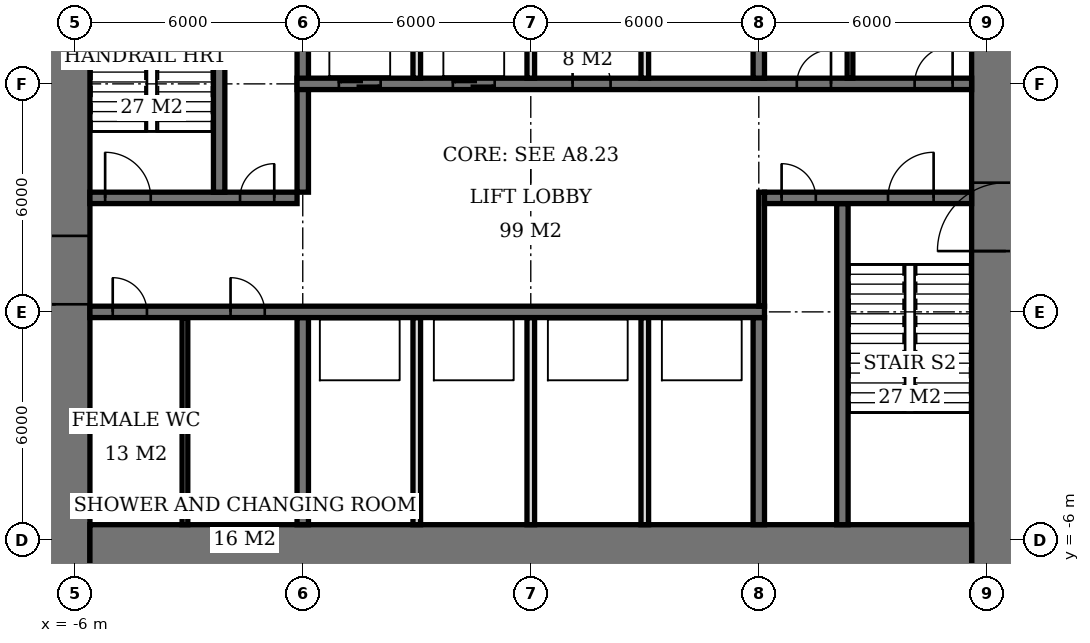
"""IFC4 building model, lengths in metres.
Left out: names, types, materials, properties, quantities, classifications, styles, units other than length and angle.
Written with IfcOpenShell. Run it as: python <this file> out.ifc"""

import sys

from ifc_helpers import new_model, si_unit, direction, frame, frame_2d, origin, place, context, subcontext, project, spatial, rectangle, extrude, element, fill, save


model = new_model("IFC4")
c1 = context("Model", 3, precision=1e-05, world=origin(), true_north=direction((0.0, 1.0)))
c2 = subcontext(c1, "Body", "Model", "MODEL_VIEW")
j1 = project(units=[si_unit("LENGTHUNIT", "METRE"), si_unit("PLANEANGLEUNIT", "RADIAN")], contexts=[c1])
p1 = place(None, origin())
s1 = spatial("IfcSite", under=j1, at=p1, CompositionType="ELEMENT")
p2 = place(p1, origin())
s2 = spatial("IfcBuilding", under=s1, at=p2, CompositionType="ELEMENT")
p3 = place(p2, frame((0.0, 0.0, 88.4)))
s3 = spatial("IfcBuildingStorey", under=s2, at=p3, CompositionType="ELEMENT", Elevation=88.4)
p4 = place(p3, frame((-5.6, -6.6, 0.0), z_axis=(0.0, 0.0, 1.0), x_axis=(1.0, 0.0, 0.0)))
e1 = element("IfcWall", 1, at=p4, inside=s3, PredefinedType="SHEAR", context=c2, shape_type="SweptSolid", body=[
    extrude(rectangle(XDim=23.2, YDim=2.0, at=frame_2d((11.6, 0.0))), origin(), (0.0, 0.0, 1.0), 5.4),
])
p5 = place(p3, frame((-6.5, -7.6, 0.0), z_axis=(0.0, 0.0, 1.0), x_axis=(0.0, 1.0, 0.0)))
e2 = element("IfcWall", 2, at=p5, inside=s3, PredefinedType="SHEAR", context=c2, shape_type="SweptSolid", body=[
    extrude(rectangle(XDim=21.2, YDim=1.8, at=frame_2d((10.6, 0.0))), origin(), (0.0, 0.0, 1.0), 5.4),
])
p6 = place(p5, frame((7.8, 0.0, 0.0)))
e3 = element("IfcOpeningElement", 3, at=p6, cuts=e2, PredefinedType="OPENING", context=c2, shape_type="SweptSolid", body=[
    extrude(rectangle(XDim=1.8, YDim=2.4, at=frame_2d((0.9, 1.2))), frame((0.0, 0.91, 0.0), z_axis=(0.0, -1.0, 0.0), x_axis=(1.0, 0.0, 0.0)), (0.0, 0.0, 1.0), 1.82),
])
p7 = place(p3, frame((18.5, -7.6, 0.0), z_axis=(0.0, 0.0, 1.0), x_axis=(0.0, 1.0, 0.0)))
e4 = element("IfcWall", 4, at=p7, inside=s3, PredefinedType="SHEAR", context=c2, shape_type="SweptSolid", body=[
    extrude(rectangle(XDim=21.2, YDim=1.8, at=frame_2d((10.6, 0.0))), origin(), (0.0, 0.0, 1.0), 5.4),
])
p8 = place(p7, frame((9.2, 0.0, 0.0)))
e5 = element("IfcOpeningElement", 5, at=p8, cuts=e4, PredefinedType="OPENING", context=c2, shape_type="SweptSolid", body=[
    extrude(rectangle(XDim=1.8, YDim=2.4, at=frame_2d((0.9, 1.2))), frame((0.0, 0.91, 0.0), z_axis=(0.0, -1.0, 0.0), x_axis=(1.0, 0.0, 0.0)), (0.0, 0.0, 1.0), 1.82),
])
p9 = place(p3, frame((-5.6, 0.0, 0.0), z_axis=(0.0, 0.0, 1.0), x_axis=(1.0, 0.0, 0.0)))
e6 = element("IfcWall", 6, at=p9, inside=s3, PredefinedType="SHEAR", context=c2, shape_type="SweptSolid", body=[
    extrude(rectangle(XDim=17.75, YDim=0.3, at=frame_2d((8.875, 0.0))), origin(), (0.0, 0.0, 1.0), 5.4),
])
p10 = place(p9, frame((0.6, 0.0, 0.0)))
e7 = element("IfcOpeningElement", 7, at=p10, cuts=e6, PredefinedType="OPENING", context=c2, shape_type="SweptSolid", body=[
    extrude(rectangle(XDim=0.9, YDim=2.1, at=frame_2d((0.45, 1.05))), frame((0.0, 0.16, 0.0), z_axis=(0.0, -1.0, 0.0), x_axis=(1.0, 0.0, 0.0)), (0.0, 0.0, 1.0), 0.32),
])
p11 = place(p9, frame((3.7, 0.0, 0.0)))
e8 = element("IfcOpeningElement", 8, at=p11, cuts=e6, PredefinedType="OPENING", context=c2, shape_type="SweptSolid", body=[
    extrude(rectangle(XDim=0.9, YDim=2.1, at=frame_2d((0.45, 1.05))), frame((0.0, 0.16, 0.0), z_axis=(0.0, -1.0, 0.0), x_axis=(1.0, 0.0, 0.0)), (0.0, 0.0, 1.0), 0.32),
])
p12 = place(p3, frame((-5.6, 3.0, 0.0), z_axis=(0.0, 0.0, 1.0), x_axis=(1.0, 0.0, 0.0)))
e9 = element("IfcWall", 9, at=p12, inside=s3, PredefinedType="SHEAR", context=c2, shape_type="SweptSolid", body=[
    extrude(rectangle(XDim=5.45, YDim=0.3, at=frame_2d((2.725, 0.0))), origin(), (0.0, 0.0, 1.0), 5.4),
])
p13 = place(p12, frame((0.4, 0.0, 0.0)))
e10 = element("IfcOpeningElement", 10, at=p13, cuts=e9, PredefinedType="OPENING", context=c2, shape_type="SweptSolid", body=[
    extrude(rectangle(XDim=1.2, YDim=2.1, at=frame_2d((0.6, 1.05))), frame((0.0, 0.16, 0.0), z_axis=(0.0, -1.0, 0.0), x_axis=(1.0, 0.0, 0.0)), (0.0, 0.0, 1.0), 0.32),
])
p14 = place(p12, frame((3.95, 0.0, 0.0)))
e11 = element("IfcOpeningElement", 11, at=p14, cuts=e9, PredefinedType="OPENING", context=c2, shape_type="SweptSolid", body=[
    extrude(rectangle(XDim=0.9, YDim=2.1, at=frame_2d((0.45, 1.05))), frame((0.0, 0.16, 0.0), z_axis=(0.0, -1.0, 0.0), x_axis=(1.0, 0.0, 0.0)), (0.0, 0.0, 1.0), 0.32),
])
p15 = place(p3, frame((12.15, 3.0, 0.0), z_axis=(0.0, 0.0, 1.0), x_axis=(1.0, 0.0, 0.0)))
e12 = element("IfcWall", 12, at=p15, inside=s3, PredefinedType="SHEAR", context=c2, shape_type="SweptSolid", body=[
    extrude(rectangle(XDim=5.45, YDim=0.3, at=frame_2d((2.725, 0.0))), origin(), (0.0, 0.0, 1.0), 5.4),
])
p16 = place(p15, frame((3.25, 0.0, 0.0)))
e13 = element("IfcOpeningElement", 13, at=p16, cuts=e12, PredefinedType="OPENING", context=c2, shape_type="SweptSolid", body=[
    extrude(rectangle(XDim=1.2, YDim=2.1, at=frame_2d((0.6, 1.05))), frame((0.0, 0.16, 0.0), z_axis=(0.0, -1.0, 0.0), x_axis=(1.0, 0.0, 0.0)), (0.0, 0.0, 1.0), 0.32),
])
p17 = place(p15, frame((0.45, 0.0, 0.0)))
e14 = element("IfcOpeningElement", 14, at=p17, cuts=e12, PredefinedType="OPENING", context=c2, shape_type="SweptSolid", body=[
    extrude(rectangle(XDim=0.9, YDim=2.1, at=frame_2d((0.45, 1.05))), frame((0.0, 0.16, 0.0), z_axis=(0.0, -1.0, 0.0), x_axis=(1.0, 0.0, 0.0)), (0.0, 0.0, 1.0), 0.32),
])
p18 = place(p3, frame((-0.15, 6.0, 0.0), z_axis=(0.0, 0.0, 1.0), x_axis=(1.0, 0.0, 0.0)))
e15 = element("IfcWall", 15, at=p18, inside=s3, PredefinedType="SHEAR", context=c2, shape_type="SweptSolid", body=[
    extrude(rectangle(XDim=17.75, YDim=0.3, at=frame_2d((8.875, 0.0))), origin(), (0.0, 0.0, 1.0), 5.4),
])
p19 = place(p18, frame((13.15, 0.0, 0.0)))
e16 = element("IfcOpeningElement", 16, at=p19, cuts=e15, PredefinedType="OPENING", context=c2, shape_type="SweptSolid", body=[
    extrude(rectangle(XDim=0.9, YDim=2.1, at=frame_2d((0.45, 1.05))), frame((0.0, 0.16, 0.0), z_axis=(0.0, -1.0, 0.0), x_axis=(1.0, 0.0, 0.0)), (0.0, 0.0, 1.0), 0.32),
])
p20 = place(p18, frame((16.25, 0.0, 0.0)))
e17 = element("IfcOpeningElement", 17, at=p20, cuts=e15, PredefinedType="OPENING", context=c2, shape_type="SweptSolid", body=[
    extrude(rectangle(XDim=1.0, YDim=2.1, at=frame_2d((0.5, 1.05))), frame((0.0, 0.16, 0.0), z_axis=(0.0, -1.0, 0.0), x_axis=(1.0, 0.0, 0.0)), (0.0, 0.0, 1.0), 0.32),
])
p21 = place(p18, frame((7.25, 0.0, 0.0)))
e18 = element("IfcOpeningElement", 18, at=p21, cuts=e15, PredefinedType="OPENING", context=c2, shape_type="SweptSolid", body=[
    extrude(rectangle(XDim=1.0, YDim=2.1, at=frame_2d((0.5, 1.05))), frame((0.0, 0.16, 0.0), z_axis=(0.0, -1.0, 0.0), x_axis=(1.0, 0.0, 0.0)), (0.0, 0.0, 1.0), 0.32),
])
p22 = place(p18, frame((1.1, 0.0, 0.0)))
e19 = element("IfcOpeningElement", 19, at=p22, cuts=e15, PredefinedType="OPENING", context=c2, shape_type="SweptSolid", body=[
    extrude(rectangle(XDim=1.1, YDim=2.1, at=frame_2d((0.55, 1.05))), frame((0.0, 0.16, 0.0), z_axis=(0.0, -1.0, 0.0), x_axis=(1.0, 0.0, 0.0)), (0.0, 0.0, 1.0), 0.32),
])
p23 = place(p18, frame((4.1, 0.0, 0.0)))
e20 = element("IfcOpeningElement", 20, at=p23, cuts=e15, PredefinedType="OPENING", context=c2, shape_type="SweptSolid", body=[
    extrude(rectangle(XDim=1.1, YDim=2.1, at=frame_2d((0.55, 1.05))), frame((0.0, 0.16, 0.0), z_axis=(0.0, -1.0, 0.0), x_axis=(1.0, 0.0, 0.0)), (0.0, 0.0, 1.0), 0.32),
])
p24 = place(p3, frame((0.0, -5.6, 0.0), z_axis=(0.0, 0.0, 1.0), x_axis=(0.0, 1.0, 0.0)))
e21 = element("IfcWall", 21, at=p24, inside=s3, PredefinedType="SHEAR", context=c2, shape_type="SweptSolid", body=[
    extrude(rectangle(XDim=5.45, YDim=0.3, at=frame_2d((2.725, 0.0))), origin(), (0.0, 0.0, 1.0), 5.4),
])
p25 = place(p3, frame((0.0, 3.15, 0.0), z_axis=(0.0, 0.0, 1.0), x_axis=(0.0, 1.0, 0.0)))
e22 = element("IfcWall", 22, at=p25, inside=s3, PredefinedType="SHEAR", context=c2, shape_type="SweptSolid", body=[
    extrude(rectangle(XDim=8.45, YDim=0.3, at=frame_2d((4.225, 0.0))), origin(), (0.0, 0.0, 1.0), 5.4),
])
for number, where, z_axis, x_axis in (
    (23, (12.0, -5.6, 0.0), (0.0, 0.0, 1.0), (0.0, 1.0, 0.0)),
    (24, (12.0, 6.15, 0.0), (0.0, 0.0, 1.0), (0.0, 1.0, 0.0)),
):
    element("IfcWall", number, at=place(p3, frame(where, z_axis=z_axis, x_axis=x_axis)), inside=s3, PredefinedType="SHEAR", context=c2, shape_type="SweptSolid", body=[
        extrude(rectangle(XDim=5.45, YDim=0.3, at=frame_2d((2.725, 0.0))), origin(), (0.0, 0.0, 1.0), 5.4),
    ])
for number, where, z_axis, x_axis in (
    (25, (-2.2, 3.15, 0.0), (0.0, 0.0, 1.0), (0.0, 1.0, 0.0)),
    (26, (14.2, -5.6, 0.0), (0.0, 0.0, 1.0), (0.0, 1.0, 0.0)),
):
    element("IfcWall", number, at=place(p3, frame(where, z_axis=z_axis, x_axis=x_axis)), inside=s3, PredefinedType="SHEAR", context=c2, shape_type="SweptSolid", body=[
        extrude(rectangle(XDim=8.45, YDim=0.3, at=frame_2d((4.225, 0.0))), origin(), (0.0, 0.0, 1.0), 5.4),
    ])
for number, where, z_axis, x_axis in (
    (27, (3.0, 6.15, 0.0), (0.0, 0.0, 1.0), (0.0, 1.0, 0.0)),
    (28, (6.0, 6.15, 0.0), (0.0, 0.0, 1.0), (0.0, 1.0, 0.0)),
    (29, (9.0, 6.15, 0.0), (0.0, 0.0, 1.0), (0.0, 1.0, 0.0)),
    (30, (3.0, -5.6, 0.0), (0.0, 0.0, 1.0), (0.0, 1.0, 0.0)),
    (31, (6.0, -5.6, 0.0), (0.0, 0.0, 1.0), (0.0, 1.0, 0.0)),
    (32, (9.0, -5.6, 0.0), (0.0, 0.0, 1.0), (0.0, 1.0, 0.0)),
):
    element("IfcWall", number, at=place(p3, frame(where, z_axis=z_axis, x_axis=x_axis)), inside=s3, PredefinedType="SOLIDWALL", context=c2, shape_type="SweptSolid", body=[
        extrude(rectangle(XDim=5.45, YDim=0.2, at=frame_2d((2.725, 0.0))), origin(), (0.0, 0.0, 1.0), 5.4),
    ])
p26 = place(p3, frame((18.651, -13.329, 0.0), z_axis=(0.0, 0.0, 1.0), x_axis=(0.707106781187, 0.707106781187, 0.0)))
e33 = element("IfcWall", 33, at=p26, inside=s3, PredefinedType="USERDEFINED", context=c2, shape_type="SweptSolid", body=[
    extrude(rectangle(XDim=9.445, YDim=0.2, at=frame_2d((4.723, 0.0))), origin(), (0.0, 0.0, 1.0), 5.4),
])
p27 = place(p26, frame((0.274, 0.0, 0.6)))
e34 = element("IfcOpeningElement", 34, at=p27, cuts=e33, PredefinedType="OPENING", context=c2, shape_type="SweptSolid", body=[
    extrude(rectangle(XDim=2.6, YDim=3.0, at=frame_2d((1.3, 1.5))), frame((0.0, 0.11, 0.0), z_axis=(0.0, -1.0, 0.0), x_axis=(1.0, 0.0, 0.0)), (0.0, 0.0, 1.0), 0.22),
])
p28 = place(p26, frame((3.423, 0.0, 0.6)))
e35 = element("IfcOpeningElement", 35, at=p28, cuts=e33, PredefinedType="OPENING", context=c2, shape_type="SweptSolid", body=[
    extrude(rectangle(XDim=2.6, YDim=3.0, at=frame_2d((1.3, 1.5))), frame((0.0, 0.11, 0.0), z_axis=(0.0, -1.0, 0.0), x_axis=(1.0, 0.0, 0.0)), (0.0, 0.0, 1.0), 0.22),
])
p29 = place(p26, frame((6.571, 0.0, 0.6)))
e36 = element("IfcOpeningElement", 36, at=p29, cuts=e33, PredefinedType="OPENING", context=c2, shape_type="SweptSolid", body=[
    extrude(rectangle(XDim=2.6, YDim=3.0, at=frame_2d((1.3, 1.5))), frame((0.0, 0.11, 0.0), z_axis=(0.0, -1.0, 0.0), x_axis=(1.0, 0.0, 0.0)), (0.0, 0.0, 1.0), 0.22),
])
for number, where, z_axis, x_axis in (
    (37, (-3.1, -5.6, 0.0), (0.0, 0.0, 1.0), (0.0, 1.0, 0.0)),
    (38, (14.4, 6.15, 0.0), (0.0, 0.0, 1.0), (0.0, 1.0, 0.0)),
):
    element("IfcWall", number, at=place(p3, frame(where, z_axis=z_axis, x_axis=x_axis)), inside=s3, PredefinedType="PLUMBINGWALL", context=c2, shape_type="SweptSolid", body=[
        extrude(rectangle(XDim=5.45, YDim=0.15, at=frame_2d((2.725, 0.0))), origin(), (0.0, 0.0, 1.0), 5.15),
    ])
p30 = place(p3, frame((12.075, 0.15, 0.0), z_axis=(0.0, 0.0, 1.0), x_axis=(0.0, 1.0, 0.0)))
e39 = element("IfcWall", 39, at=p30, inside=s3, PredefinedType="PARTITIONING", context=c2, shape_type="SweptSolid", body=[
    extrude(rectangle(XDim=3.0, YDim=0.15, at=frame_2d((1.5, 0.0))), origin(), (0.0, 0.0, 1.0), 5.15),
])
p31 = place(p6, origin())
e40 = element("IfcDoor", 40, at=p31, inside=s3, OperationType="DOUBLE_DOOR_SINGLE_SWING", PredefinedType="DOOR", context=c2, shape_type="SweptSolid", body=[
    extrude(rectangle(XDim=1.8, YDim=2.4, at=frame_2d((0.9, 1.2))), frame((0.0, 0.025, 0.0), z_axis=(0.0, -1.0, 0.0), x_axis=(1.0, 0.0, 0.0)), (0.0, 0.0, 1.0), 0.05),
])
fill(e3, e40)
p32 = place(p8, origin())
e41 = element("IfcDoor", 41, at=p32, inside=s3, OperationType="DOUBLE_DOOR_SINGLE_SWING", PredefinedType="DOOR", context=c2, shape_type="SweptSolid", body=[
    extrude(rectangle(XDim=1.8, YDim=2.4, at=frame_2d((0.9, 1.2))), frame((0.0, 0.025, 0.0), z_axis=(0.0, -1.0, 0.0), x_axis=(1.0, 0.0, 0.0)), (0.0, 0.0, 1.0), 0.05),
])
fill(e5, e41)
p33 = place(p13, origin())
e42 = element("IfcDoor", 42, at=p33, inside=s3, OperationType="SINGLE_SWING_LEFT", PredefinedType="DOOR", context=c2, shape_type="SweptSolid", body=[
    extrude(rectangle(XDim=1.2, YDim=2.1, at=frame_2d((0.6, 1.05))), frame((0.0, 0.025, 0.0), z_axis=(0.0, -1.0, 0.0), x_axis=(1.0, 0.0, 0.0)), (0.0, 0.0, 1.0), 0.05),
])
fill(e10, e42)
p34 = place(p14, origin())
e43 = element("IfcDoor", 43, at=p34, inside=s3, OperationType="SINGLE_SWING_RIGHT", PredefinedType="DOOR", context=c2, shape_type="SweptSolid", body=[
    extrude(rectangle(XDim=0.9, YDim=2.1, at=frame_2d((0.45, 1.05))), frame((0.0, 0.025, 0.0), z_axis=(0.0, -1.0, 0.0), x_axis=(1.0, 0.0, 0.0)), (0.0, 0.0, 1.0), 0.05),
])
fill(e11, e43)
p35 = place(p16, origin())
e44 = element("IfcDoor", 44, at=p35, inside=s3, OperationType="SINGLE_SWING_RIGHT", PredefinedType="DOOR", context=c2, shape_type="SweptSolid", body=[
    extrude(rectangle(XDim=1.2, YDim=2.1, at=frame_2d((0.6, 1.05))), frame((0.0, 0.025, 0.0), z_axis=(0.0, -1.0, 0.0), x_axis=(1.0, 0.0, 0.0)), (0.0, 0.0, 1.0), 0.05),
])
fill(e13, e44)
p36 = place(p17, origin())
e45 = element("IfcDoor", 45, at=p36, inside=s3, OperationType="SINGLE_SWING_LEFT", PredefinedType="DOOR", context=c2, shape_type="SweptSolid", body=[
    extrude(rectangle(XDim=0.9, YDim=2.1, at=frame_2d((0.45, 1.05))), frame((0.0, 0.025, 0.0), z_axis=(0.0, -1.0, 0.0), x_axis=(1.0, 0.0, 0.0)), (0.0, 0.0, 1.0), 0.05),
])
fill(e14, e45)
p37 = place(p10, origin())
e46 = element("IfcDoor", 46, at=p37, inside=s3, OperationType="SINGLE_SWING_LEFT", PredefinedType="DOOR", context=c2, shape_type="SweptSolid", body=[
    extrude(rectangle(XDim=0.9, YDim=2.1, at=frame_2d((0.45, 1.05))), frame((0.0, 0.025, 0.0), z_axis=(0.0, -1.0, 0.0), x_axis=(1.0, 0.0, 0.0)), (0.0, 0.0, 1.0), 0.05),
])
fill(e7, e46)
p38 = place(p11, origin())
e47 = element("IfcDoor", 47, at=p38, inside=s3, OperationType="SINGLE_SWING_LEFT", PredefinedType="DOOR", context=c2, shape_type="SweptSolid", body=[
    extrude(rectangle(XDim=0.9, YDim=2.1, at=frame_2d((0.45, 1.05))), frame((0.0, 0.025, 0.0), z_axis=(0.0, -1.0, 0.0), x_axis=(1.0, 0.0, 0.0)), (0.0, 0.0, 1.0), 0.05),
])
fill(e8, e47)
p39 = place(p19, origin())
e48 = element("IfcDoor", 48, at=p39, inside=s3, OperationType="SINGLE_SWING_RIGHT", PredefinedType="DOOR", context=c2, shape_type="SweptSolid", body=[
    extrude(rectangle(XDim=0.9, YDim=2.1, at=frame_2d((0.45, 1.05))), frame((0.0, 0.025, 0.0), z_axis=(0.0, -1.0, 0.0), x_axis=(1.0, 0.0, 0.0)), (0.0, 0.0, 1.0), 0.05),
])
fill(e16, e48)
p40 = place(p20, origin())
e49 = element("IfcDoor", 49, at=p40, inside=s3, OperationType="SINGLE_SWING_RIGHT", PredefinedType="DOOR", context=c2, shape_type="SweptSolid", body=[
    extrude(rectangle(XDim=1.0, YDim=2.1, at=frame_2d((0.5, 1.05))), frame((0.0, 0.025, 0.0), z_axis=(0.0, -1.0, 0.0), x_axis=(1.0, 0.0, 0.0)), (0.0, 0.0, 1.0), 0.05),
])
fill(e17, e49)
p41 = place(p21, origin())
e50 = element("IfcDoor", 50, at=p41, inside=s3, OperationType="SINGLE_SWING_LEFT", PredefinedType="DOOR", context=c2, shape_type="SweptSolid", body=[
    extrude(rectangle(XDim=1.0, YDim=2.1, at=frame_2d((0.5, 1.05))), frame((0.0, 0.025, 0.0), z_axis=(0.0, -1.0, 0.0), x_axis=(1.0, 0.0, 0.0)), (0.0, 0.0, 1.0), 0.05),
])
fill(e18, e50)
p42 = place(p22, origin())
e51 = element("IfcDoor", 51, at=p42, inside=s3, OperationType="DOUBLE_DOOR_SLIDING", PredefinedType="USERDEFINED", context=c2, shape_type="SweptSolid", body=[
    extrude(rectangle(XDim=1.1, YDim=2.1, at=frame_2d((0.55, 1.05))), frame((0.0, 0.025, 0.0), z_axis=(0.0, -1.0, 0.0), x_axis=(1.0, 0.0, 0.0)), (0.0, 0.0, 1.0), 0.05),
])
fill(e19, e51)
p43 = place(p23, origin())
e52 = element("IfcDoor", 52, at=p43, inside=s3, OperationType="DOUBLE_DOOR_SLIDING", PredefinedType="USERDEFINED", context=c2, shape_type="SweptSolid", body=[
    extrude(rectangle(XDim=1.1, YDim=2.1, at=frame_2d((0.55, 1.05))), frame((0.0, 0.025, 0.0), z_axis=(0.0, -1.0, 0.0), x_axis=(1.0, 0.0, 0.0)), (0.0, 0.0, 1.0), 0.05),
])
fill(e20, e52)
save(model, sys.argv[1])
